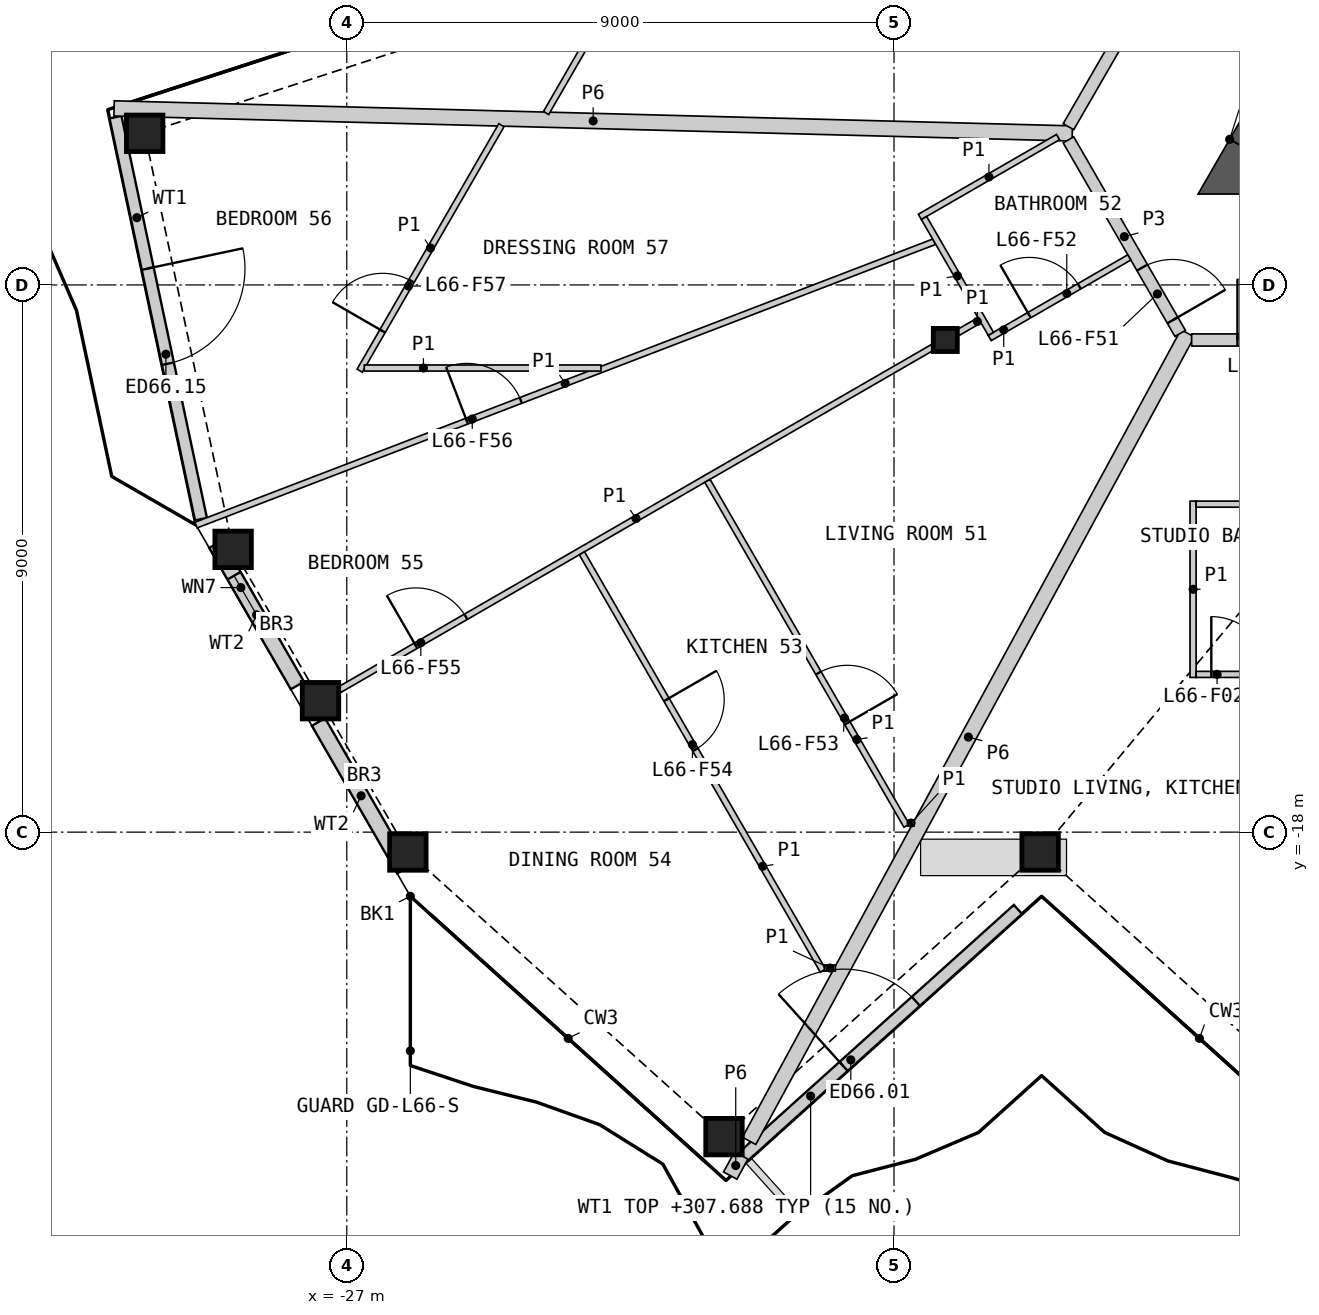
"""IFC4 building model, lengths in metres.
Left out: names, types, materials, properties, quantities, classifications, styles, units other than length and angle.
Written with IfcOpenShell. Run it as: python <this file> out.ifc"""

import sys

from ifc_helpers import new_model, si_unit, direction, frame, frame_2d, origin, origin_2d, place, context, subcontext, project, spatial, polyline, rectangle, hollow_rectangle, i_section, outline, extrude, element, fill, save


model = new_model("IFC4")
c1 = context("Model", 3, precision=1e-05, world=origin(), true_north=direction((0.0, 1.0)))
c2 = subcontext(c1, "Body", "Model", "MODEL_VIEW")
j1 = project(units=[si_unit("LENGTHUNIT", "METRE"), si_unit("PLANEANGLEUNIT", "RADIAN")], contexts=[c1])
p1 = place(None, origin())
s1 = spatial("IfcSite", under=j1, at=p1, CompositionType="ELEMENT")
p2 = place(p1, origin())
s2 = spatial("IfcBuilding", under=s1, at=p2, CompositionType="ELEMENT")
p3 = place(p2, frame((0.0, 0.0, 305.2)))
s3 = spatial("IfcBuildingStorey", under=s2, at=p3, CompositionType="ELEMENT", Elevation=305.2)
for number, where, z_axis, x_axis in (
    (1, (-25.995, -18.327, 0.0), (0.0, 0.0, 1.0), (1.0, 0.0, 0.0)),
    (2, (-20.796, -23.008, 0.0), (0.0, 0.0, 1.0), (1.0, 0.0, 0.0)),
    (3, (-15.597, -18.327, 0.0), (0.0, 0.0, 1.0), (1.0, 0.0, 0.0)),
    (4, (-30.324, -6.506, 0.0), (0.0, 0.0, 1.0), (1.0, 0.0, 0.0)),
    (5, (-28.869, -13.349, 0.0), (0.0, 0.0, 1.0), (1.0, 0.0, 0.0)),
    (6, (-27.432, -15.838, 0.0), (0.0, 0.0, 1.0), (1.0, 0.0, 0.0)),
):
    element("IfcColumn", number, at=place(p3, frame(where, z_axis=z_axis, x_axis=x_axis)), inside=s3, PredefinedType="COLUMN", context=c2, shape_type="SweptSolid", body=[
        extrude(hollow_rectangle(XDim=0.6, YDim=0.6, WallThickness=0.04, at=origin_2d()), origin(), (0.0, 0.0, 1.0), 3.4),
    ])
p4 = place(p3, frame((-17.157, -9.906, 0.0), z_axis=(0.0, 0.0, 1.0), x_axis=(1.0, 0.0, 0.0)))
e7 = element("IfcColumn", 7, at=p4, inside=s3, PredefinedType="COLUMN", context=c2, shape_type="SweptSolid", body=[
    extrude(i_section(OverallWidth=0.396, OverallDepth=0.381, WebThickness=0.019, FlangeThickness=0.03, at=origin_2d()), origin(), (0.0, 0.0, 1.0), 3.4),
])
p5 = place(p3, frame((-20.508, -23.364, 0.0), z_axis=(0.0, 0.0, 1.0), x_axis=(0.743135364919, 0.669141113224, 0.0)))
e8 = element("IfcWall", 8, at=p5, inside=s3, PredefinedType="SOLIDWALL", context=c2, shape_type="SweptSolid", body=[
    extrude(rectangle(XDim=6.117, YDim=0.2, at=frame_2d((3.059, 0.0))), origin(), (0.0, 0.0, 1.0), 2.488),
])
p6 = place(p5, frame((2.259, 0.0, 0.0)))
e9 = element("IfcOpeningElement", 9, at=p6, cuts=e8, PredefinedType="OPENING", context=c2, shape_type="SweptSolid", body=[
    extrude(rectangle(XDim=1.6, YDim=2.25, at=frame_2d((0.8, 1.125))), frame((0.0, 0.11, 0.0), z_axis=(0.0, -1.0, 0.0), x_axis=(1.0, 0.0, 0.0)), (0.0, 0.0, 1.0), 0.22),
])
p7 = place(p3, frame((-30.803, -6.241, 0.0), z_axis=(0.0, 0.0, 1.0), x_axis=(0.207917941651, -0.978146272057, 0.0)))
e10 = element("IfcWall", 10, at=p7, inside=s3, PredefinedType="SOLIDWALL", context=c2, shape_type="SweptSolid", body=[
    extrude(rectangle(XDim=6.759, YDim=0.2, at=frame_2d((3.379, 0.0))), origin(), (0.0, 0.0, 1.0), 2.488),
])
p8 = place(p7, frame((2.545, 0.0, 0.0)))
e11 = element("IfcOpeningElement", 11, at=p8, cuts=e10, PredefinedType="OPENING", context=c2, shape_type="SweptSolid", body=[
    extrude(rectangle(XDim=1.6, YDim=2.25, at=frame_2d((0.8, 1.125))), frame((0.0, 0.11, 0.0), z_axis=(0.0, -1.0, 0.0), x_axis=(1.0, 0.0, 0.0)), (0.0, 0.0, 1.0), 0.22),
])
p9 = place(p3, frame((-29.154, -13.263, 0.0), z_axis=(0.0, 0.0, 1.0), x_axis=(0.500032109083, -0.866006864803, 0.0)))
e12 = element("IfcWall", 12, at=p9, inside=s3, PredefinedType="SOLIDWALL", context=c2, shape_type="SweptSolid", body=[
    extrude(rectangle(XDim=2.684, YDim=0.25, at=frame_2d((1.342, 0.0))), origin(), (0.0, 0.0, 1.0), 2.488),
])
p10 = place(p9, frame((0.6, 0.0, 0.4)))
e13 = element("IfcOpeningElement", 13, at=p10, cuts=e12, PredefinedType="OPENING", context=c2, shape_type="SweptSolid", body=[
    extrude(rectangle(XDim=0.9, YDim=0.6, at=frame_2d((0.45, 0.3))), frame((0.0, 0.135, 0.0), z_axis=(0.0, -1.0, 0.0), x_axis=(1.0, 0.0, 0.0)), (0.0, 0.0, 1.0), 0.27),
])
p11 = place(p3, frame((-27.466, -16.188, 0.0), z_axis=(0.0, 0.0, 1.0), x_axis=(0.499968627931, -0.866043515699, 0.0)))
e14 = element("IfcWall", 14, at=p11, inside=s3, PredefinedType="SOLIDWALL", context=c2, shape_type="SweptSolid", body=[
    extrude(rectangle(XDim=2.804, YDim=0.25, at=frame_2d((1.402, 0.0))), origin(), (0.0, 0.0, 1.0), 2.488),
])
p12 = place(p3, frame((-9.562, -2.15, 0.0), z_axis=(0.0, 0.0, 1.0), x_axis=(-0.500015214976, -0.866016619236, 0.0)))
e15 = element("IfcWall", 15, at=p12, inside=s3, PredefinedType="SHEAR", context=c2, shape_type="SweptSolid", body=[
    extrude(rectangle(XDim=5.318, YDim=0.6, at=frame_2d((2.659, 0.0))), origin(), (0.0, 0.0, 1.0), 3.1),
])
p13 = place(p3, origin())
e16 = element("IfcWall", 16, at=p13, inside=s3, PredefinedType="SHEAR", context=c2, shape_type="SweptSolid", body=[
    extrude(outline(polyline([(-12.48, -6.606), (-11.961, -6.906), (-11.961, -7.506), (-13.0, -7.506), (-12.48, -6.606)])), origin(), (0.0, 0.0, 1.0), 3.1),
])
p14 = place(p3, frame((-30.827, -6.096, 0.0), z_axis=(0.0, 0.0, 1.0), x_axis=(0.999657799118, -0.026158835273, 0.0)))
e17 = element("IfcWall", 17, at=p14, inside=s3, PredefinedType="PARTITIONING", context=c2, shape_type="SweptSolid", body=[
    extrude(rectangle(XDim=15.763, YDim=0.25, at=frame_2d((7.882, 0.0))), origin(), (0.0, 0.0, 1.0), 2.33),
])
p15 = place(p3, frame((-20.383, -23.078, 0.0), z_axis=(0.0, 0.0, 1.0), x_axis=(0.477177412766, 0.878806984921, 0.0)))
e18 = element("IfcWall", 18, at=p15, inside=s3, PredefinedType="PARTITIONING", context=c2, shape_type="SweptSolid", body=[
    extrude(rectangle(XDim=15.114, YDim=0.25, at=frame_2d((7.557, 0.0))), origin(), (0.0, 0.0, 1.0), 2.33),
])
p16 = place(p3, frame((-13.106, -9.906, 0.0), z_axis=(0.0, 0.0, 1.0), x_axis=(1.0, 0.0, 0.0)))
e19 = element("IfcWall", 19, at=p16, inside=s3, PredefinedType="PARTITIONING", context=c2, shape_type="SweptSolid", body=[
    extrude(rectangle(XDim=4.32, YDim=0.2, at=frame_2d((2.16, 0.0))), origin(), (0.0, 0.0, 1.0), 3.1),
])
p17 = place(p16, frame((0.753, 0.0, 0.0)))
e20 = element("IfcOpeningElement", 20, at=p17, cuts=e19, PredefinedType="OPENING", context=c2, shape_type="SweptSolid", body=[
    extrude(rectangle(XDim=1.0, YDim=2.1, at=frame_2d((0.5, 1.05))), frame((0.0, 0.11, 0.0), z_axis=(0.0, -1.0, 0.0), x_axis=(1.0, 0.0, 0.0)), (0.0, 0.0, 1.0), 0.22),
])
p18 = place(p3, frame((-15.131, -6.397, 0.0), z_axis=(0.0, 0.0, 1.0), x_axis=(0.500003406062, 0.866023437285, 0.0)))
e21 = element("IfcWall", 21, at=p18, inside=s3, PredefinedType="PARTITIONING", context=c2, shape_type="SweptSolid", body=[
    extrude(rectangle(XDim=4.288, YDim=0.2, at=frame_2d((2.144, 0.0))), origin(), (0.0, 0.0, 1.0), 3.1),
])
p19 = place(p3, frame((-15.131, -6.614, 0.0), z_axis=(0.0, 0.0, 1.0), x_axis=(0.499967746641, -0.866044024469, 0.0)))
e22 = element("IfcWall", 22, at=p19, inside=s3, PredefinedType="PARTITIONING", context=c2, shape_type="SweptSolid", body=[
    extrude(rectangle(XDim=3.676, YDim=0.2, at=frame_2d((1.838, 0.0))), origin(), (0.0, 0.0, 1.0), 3.1),
])
p20 = place(p19, frame((2.426, 0.0, 0.0)))
e23 = element("IfcOpeningElement", 23, at=p20, cuts=e22, PredefinedType="OPENING", context=c2, shape_type="SweptSolid", body=[
    extrude(rectangle(XDim=1.0, YDim=2.1, at=frame_2d((0.5, 1.05))), frame((0.0, 0.11, 0.0), z_axis=(0.0, -1.0, 0.0), x_axis=(1.0, 0.0, 0.0)), (0.0, 0.0, 1.0), 0.22),
])
p21 = place(p3, frame((-20.693, -23.649, 0.0), z_axis=(0.0, 0.0, 1.0), x_axis=(0.477077538769, 0.878861207474, 0.0)))
e24 = element("IfcWall", 24, at=p21, inside=s3, PredefinedType="PARTITIONING", context=c2, shape_type="SweptSolid", body=[
    extrude(rectangle(XDim=0.376, YDim=0.25, at=frame_2d((0.188, 0.0))), origin(), (0.0, 0.0, 1.0), 2.33),
])
p22 = place(p3, frame((-29.479, -12.95, 0.0), z_axis=(0.0, 0.0, 1.0), x_axis=(0.933581523131, 0.358365092703, 0.0)))
e25 = element("IfcWall", 25, at=p22, inside=s3, PredefinedType="PARTITIONING", context=c2, shape_type="SweptSolid", body=[
    extrude(rectangle(XDim=13.005, YDim=0.1, at=frame_2d((6.502, 0.0))), origin(), (0.0, 0.0, 1.0), 2.33),
])
p23 = place(p22, frame((4.771, 0.0, 0.0)))
e26 = element("IfcOpeningElement", 26, at=p23, cuts=e25, PredefinedType="OPENING", context=c2, shape_type="SweptSolid", body=[
    extrude(rectangle(XDim=0.95, YDim=2.1, at=frame_2d((0.475, 1.05))), frame((0.0, 0.06, 0.0), z_axis=(0.0, -1.0, 0.0), x_axis=(1.0, 0.0, 0.0)), (0.0, 0.0, 1.0), 0.12),
])
p24 = place(p3, frame((-27.122, -15.659, 0.0), z_axis=(0.0, 0.0, 1.0), x_axis=(0.866021046153, 0.500007547564, 0.0)))
e27 = element("IfcWall", 27, at=p24, inside=s3, PredefinedType="PARTITIONING", context=c2, shape_type="SweptSolid", body=[
    extrude(rectangle(XDim=11.267, YDim=0.1, at=frame_2d((5.634, 0.0))), origin(), (0.0, 0.0, 1.0), 2.33),
])
p25 = place(p24, frame((1.452, 0.0, 0.0)))
e28 = element("IfcOpeningElement", 28, at=p25, cuts=e27, PredefinedType="OPENING", context=c2, shape_type="SweptSolid", body=[
    extrude(rectangle(XDim=0.95, YDim=2.1, at=frame_2d((0.475, 1.05))), frame((0.0, 0.06, 0.0), z_axis=(0.0, -1.0, 0.0), x_axis=(1.0, 0.0, 0.0)), (0.0, 0.0, 1.0), 0.12),
])
p26 = place(p3, frame((-23.133, -13.414, 0.0), z_axis=(0.0, 0.0, 1.0), x_axis=(0.500014841469, -0.866016834889, 0.0)))
e29 = element("IfcWall", 29, at=p26, inside=s3, PredefinedType="PARTITIONING", context=c2, shape_type="SweptSolid", body=[
    extrude(rectangle(XDim=7.927, YDim=0.1, at=frame_2d((3.963, 0.0))), origin(), (0.0, 0.0, 1.0), 2.33),
])
p27 = place(p26, frame((2.78, 0.0, 0.0)))
e30 = element("IfcOpeningElement", 30, at=p27, cuts=e29, PredefinedType="OPENING", context=c2, shape_type="SweptSolid", body=[
    extrude(rectangle(XDim=0.95, YDim=2.1, at=frame_2d((0.475, 1.05))), frame((0.0, 0.06, 0.0), z_axis=(0.0, -1.0, 0.0), x_axis=(1.0, 0.0, 0.0)), (0.0, 0.0, 1.0), 0.12),
])
p28 = place(p3, frame((-23.722, -6.172, 0.0), z_axis=(0.0, 0.0, 1.0), x_axis=(0.499991774685, 0.86603015262, 0.0)))
e31 = element("IfcWall", 31, at=p28, inside=s3, PredefinedType="PARTITIONING", context=c2, shape_type="SweptSolid", body=[
    extrude(rectangle(XDim=6.774, YDim=0.1, at=frame_2d((3.387, 0.0))), origin(), (0.0, 0.0, 1.0), 2.33),
])
p29 = place(p28, frame((3.364, 0.0, 0.0)))
e32 = element("IfcOpeningElement", 32, at=p29, cuts=e31, PredefinedType="OPENING", context=c2, shape_type="SweptSolid", body=[
    extrude(rectangle(XDim=0.95, YDim=2.1, at=frame_2d((0.475, 1.05))), frame((0.0, 0.06, 0.0), z_axis=(0.0, -1.0, 0.0), x_axis=(1.0, 0.0, 0.0)), (0.0, 0.0, 1.0), 0.12),
])
p30 = place(p3, frame((-21.069, -12.222, 0.0), z_axis=(0.0, 0.0, 1.0), x_axis=(0.499991310556, -0.866030420579, 0.0)))
e33 = element("IfcWall", 33, at=p30, inside=s3, PredefinedType="PARTITIONING", context=c2, shape_type="SweptSolid", body=[
    extrude(rectangle(XDim=6.55, YDim=0.1, at=frame_2d((3.275, 0.0))), origin(), (0.0, 0.0, 1.0), 2.33),
])
p31 = place(p30, frame((3.65, 0.0, 0.0)))
e34 = element("IfcOpeningElement", 34, at=p31, cuts=e33, PredefinedType="OPENING", context=c2, shape_type="SweptSolid", body=[
    extrude(rectangle(XDim=0.95, YDim=2.1, at=frame_2d((0.475, 1.05))), frame((0.0, 0.06, 0.0), z_axis=(0.0, -1.0, 0.0), x_axis=(1.0, 0.0, 0.0)), (0.0, 0.0, 1.0), 0.12),
])
p32 = place(p3, frame((-26.788, -10.41, 0.0), z_axis=(0.0, 0.0, 1.0), x_axis=(0.499997484116, 0.866026856326, 0.0)))
e35 = element("IfcWall", 35, at=p32, inside=s3, PredefinedType="PARTITIONING", context=c2, shape_type="SweptSolid", body=[
    extrude(rectangle(XDim=4.662, YDim=0.1, at=frame_2d((2.331, 0.0))), origin(), (0.0, 0.0, 1.0), 2.33),
])
p33 = place(p32, frame((0.752, 0.0, 0.0)))
e36 = element("IfcOpeningElement", 36, at=p33, cuts=e35, PredefinedType="OPENING", context=c2, shape_type="SweptSolid", body=[
    extrude(rectangle(XDim=0.95, YDim=2.1, at=frame_2d((0.475, 1.05))), frame((0.0, 0.06, 0.0), z_axis=(0.0, -1.0, 0.0), x_axis=(1.0, 0.0, 0.0)), (0.0, 0.0, 1.0), 0.12),
])
p34 = place(p3, frame((-26.712, -10.367, 0.0), z_axis=(0.0, 0.0, 1.0), x_axis=(1.0, 0.0, 0.0)))
e37 = element("IfcWall", 37, at=p34, inside=s3, PredefinedType="PARTITIONING", context=c2, shape_type="SweptSolid", body=[
    extrude(rectangle(XDim=3.893, YDim=0.1, at=frame_2d((1.946, 0.0))), origin(), (0.0, 0.0, 1.0), 2.33),
])
p35 = place(p3, frame((-13.082, -15.456, 0.0), z_axis=(0.0, 0.0, 1.0), x_axis=(0.0, 1.0, 0.0)))
e38 = element("IfcWall", 38, at=p35, inside=s3, PredefinedType="PARTITIONING", context=c2, shape_type="SweptSolid", body=[
    extrude(rectangle(XDim=2.9, YDim=0.1, at=frame_2d((1.45, 0.0))), origin(), (0.0, 0.0, 1.0), 2.33),
])
p36 = place(p3, frame((-16.426, -9.872, 0.0), z_axis=(0.0, 0.0, 1.0), x_axis=(0.866029095148, 0.499993606316, 0.0)))
e39 = element("IfcWall", 39, at=p36, inside=s3, PredefinedType="PARTITIONING", context=c2, shape_type="SweptSolid", body=[
    extrude(rectangle(XDim=2.65, YDim=0.1, at=frame_2d((1.325, 0.0))), origin(), (0.0, 0.0, 1.0), 2.33),
])
p37 = place(p36, frame((0.75, 0.0, 0.0)))
e40 = element("IfcOpeningElement", 40, at=p37, cuts=e39, PredefinedType="OPENING", context=c2, shape_type="SweptSolid", body=[
    extrude(rectangle(XDim=0.95, YDim=2.1, at=frame_2d((0.475, 1.05))), frame((0.0, 0.06, 0.0), z_axis=(0.0, -1.0, 0.0), x_axis=(1.0, 0.0, 0.0)), (0.0, 0.0, 1.0), 0.12),
])
p38 = place(p3, frame((-13.032, -12.606, 0.0), z_axis=(0.0, 0.0, 1.0), x_axis=(1.0, 0.0, 0.0)))
e41 = element("IfcWall", 41, at=p38, inside=s3, PredefinedType="PARTITIONING", context=c2, shape_type="SweptSolid", body=[
    extrude(rectangle(XDim=2.525, YDim=0.1, at=frame_2d((1.263, 0.0))), origin(), (0.0, 0.0, 1.0), 2.33),
])
p39 = place(p3, frame((-13.032, -15.406, 0.0), z_axis=(0.0, 0.0, 1.0), x_axis=(1.0, 0.0, 0.0)))
e42 = element("IfcWall", 42, at=p39, inside=s3, PredefinedType="PARTITIONING", context=c2, shape_type="SweptSolid", body=[
    extrude(rectangle(XDim=2.525, YDim=0.1, at=frame_2d((1.263, 0.0))), origin(), (0.0, 0.0, 1.0), 2.33),
])
p40 = place(p39, frame((0.25, 0.0, 0.0)))
e43 = element("IfcOpeningElement", 43, at=p40, cuts=e42, PredefinedType="OPENING", context=c2, shape_type="SweptSolid", body=[
    extrude(rectangle(XDim=0.95, YDim=2.1, at=frame_2d((0.475, 1.05))), frame((0.0, 0.06, 0.0), z_axis=(0.0, -1.0, 0.0), x_axis=(1.0, 0.0, 0.0)), (0.0, 0.0, 1.0), 0.12),
])
p41 = place(p3, frame((-17.575, -7.881, 0.0), z_axis=(0.0, 0.0, 1.0), x_axis=(0.866013657776, 0.500020344131, 0.0)))
e44 = element("IfcWall", 44, at=p41, inside=s3, PredefinedType="PARTITIONING", context=c2, shape_type="SweptSolid", body=[
    extrude(rectangle(XDim=2.625, YDim=0.1, at=frame_2d((1.312, 0.0))), origin(), (0.0, 0.0, 1.0), 2.33),
])
p42 = place(p3, frame((-17.507, -7.899, 0.0), z_axis=(0.0, 0.0, 1.0), x_axis=(0.499946605688, -0.86605622881, 0.0)))
e45 = element("IfcWall", 45, at=p42, inside=s3, PredefinedType="PARTITIONING", context=c2, shape_type="SweptSolid", body=[
    extrude(rectangle(XDim=2.2, YDim=0.1, at=frame_2d((1.1, 0.0))), origin(), (0.0, 0.0, 1.0), 2.33),
])
p43 = place(p3, frame((-16.949, -9.786, 0.0), z_axis=(0.0, 0.0, 1.0), x_axis=(0.866036909293, 0.499980071345, 0.0)))
e46 = element("IfcWall", 46, at=p43, inside=s3, PredefinedType="PARTITIONING", context=c2, shape_type="SweptSolid", body=[
    extrude(rectangle(XDim=0.41, YDim=0.1, at=frame_2d((0.205, 0.0))), origin(), (0.0, 0.0, 1.0), 2.33),
])
p44 = place(p3, frame((-19.145, -20.235, 0.0), z_axis=(0.0, 0.0, 1.0), x_axis=(1.0, 0.0, 0.0)))
e47 = element("IfcWall", 47, at=p44, inside=s3, PredefinedType="PARTITIONING", context=c2, shape_type="SweptSolid", body=[
    extrude(rectangle(XDim=0.18, YDim=0.1, at=frame_2d((0.09, 0.0))), origin(), (0.0, 0.0, 1.0), 2.33),
])
p45 = place(p3, frame((-17.769, -17.852, 0.0), z_axis=(0.0, 0.0, 1.0), x_axis=(1.0, 0.0, 0.0)))
e48 = element("IfcWall", 48, at=p45, inside=s3, PredefinedType="PARTITIONING", context=c2, shape_type="SweptSolid", body=[
    extrude(rectangle(XDim=0.098, YDim=0.1, at=frame_2d((0.049, 0.0))), origin(), (0.0, 0.0, 1.0), 2.33),
])
p46 = place(p6, origin())
e49 = element("IfcDoor", 49, at=p46, inside=s3, OperationType="DOUBLE_DOOR_SINGLE_SWING", PredefinedType="DOOR", context=c2, shape_type="SweptSolid", body=[
    extrude(rectangle(XDim=1.6, YDim=2.25, at=frame_2d((0.8, 1.125))), frame((0.0, 0.025, 0.0), z_axis=(0.0, -1.0, 0.0), x_axis=(1.0, 0.0, 0.0)), (0.0, 0.0, 1.0), 0.05),
])
fill(e9, e49)
p47 = place(p8, origin())
e50 = element("IfcDoor", 50, at=p47, inside=s3, OperationType="DOUBLE_DOOR_SINGLE_SWING", PredefinedType="DOOR", context=c2, shape_type="SweptSolid", body=[
    extrude(rectangle(XDim=1.6, YDim=2.25, at=frame_2d((0.8, 1.125))), frame((0.0, 0.025, 0.0), z_axis=(0.0, -1.0, 0.0), x_axis=(1.0, 0.0, 0.0)), (0.0, 0.0, 1.0), 0.05),
])
fill(e11, e50)
p48 = place(p10, origin())
e51 = element("IfcWindow", 51, at=p48, inside=s3, PartitioningType="SINGLE_PANEL", PredefinedType="WINDOW", context=c2, shape_type="SweptSolid", body=[
    extrude(rectangle(XDim=0.9, YDim=0.6, at=frame_2d((0.45, 0.3))), frame((0.0, 0.03, 0.0), z_axis=(0.0, -1.0, 0.0), x_axis=(1.0, 0.0, 0.0)), (0.0, 0.0, 1.0), 0.06),
])
fill(e13, e51)
p49 = place(p17, origin())
e52 = element("IfcDoor", 52, at=p49, inside=s3, OperationType="SINGLE_SWING_LEFT", PredefinedType="DOOR", context=c2, shape_type="SweptSolid", body=[
    extrude(rectangle(XDim=1.0, YDim=2.1, at=frame_2d((0.5, 1.05))), frame((0.0, 0.025, 0.0), z_axis=(0.0, -1.0, 0.0), x_axis=(1.0, 0.0, 0.0)), (0.0, 0.0, 1.0), 0.05),
])
fill(e20, e52)
p50 = place(p40, origin())
e53 = element("IfcDoor", 53, at=p50, inside=s3, OperationType="SINGLE_SWING_LEFT", PredefinedType="DOOR", context=c2, shape_type="SweptSolid", body=[
    extrude(rectangle(XDim=0.95, YDim=2.1, at=frame_2d((0.475, 1.05))), frame((0.0, 0.025, 0.0), z_axis=(0.0, -1.0, 0.0), x_axis=(1.0, 0.0, 0.0)), (0.0, 0.0, 1.0), 0.05),
])
fill(e43, e53)
p51 = place(p20, origin())
e54 = element("IfcDoor", 54, at=p51, inside=s3, OperationType="SINGLE_SWING_RIGHT", PredefinedType="DOOR", context=c2, shape_type="SweptSolid", body=[
    extrude(rectangle(XDim=1.0, YDim=2.1, at=frame_2d((0.5, 1.05))), frame((0.0, 0.025, 0.0), z_axis=(0.0, -1.0, 0.0), x_axis=(1.0, 0.0, 0.0)), (0.0, 0.0, 1.0), 0.05),
])
fill(e23, e54)
p52 = place(p37, origin())
e55 = element("IfcDoor", 55, at=p52, inside=s3, OperationType="SINGLE_SWING_LEFT", PredefinedType="DOOR", context=c2, shape_type="SweptSolid", body=[
    extrude(rectangle(XDim=0.95, YDim=2.1, at=frame_2d((0.475, 1.05))), frame((0.0, 0.025, 0.0), z_axis=(0.0, -1.0, 0.0), x_axis=(1.0, 0.0, 0.0)), (0.0, 0.0, 1.0), 0.05),
])
fill(e40, e55)
p53 = place(p31, origin())
e56 = element("IfcDoor", 56, at=p53, inside=s3, OperationType="SINGLE_SWING_RIGHT", PredefinedType="DOOR", context=c2, shape_type="SweptSolid", body=[
    extrude(rectangle(XDim=0.95, YDim=2.1, at=frame_2d((0.475, 1.05))), frame((0.0, 0.025, 0.0), z_axis=(0.0, -1.0, 0.0), x_axis=(1.0, 0.0, 0.0)), (0.0, 0.0, 1.0), 0.05),
])
fill(e34, e56)
p54 = place(p27, origin())
e57 = element("IfcDoor", 57, at=p54, inside=s3, OperationType="SINGLE_SWING_LEFT", PredefinedType="DOOR", context=c2, shape_type="SweptSolid", body=[
    extrude(rectangle(XDim=0.95, YDim=2.1, at=frame_2d((0.475, 1.05))), frame((0.0, 0.025, 0.0), z_axis=(0.0, -1.0, 0.0), x_axis=(1.0, 0.0, 0.0)), (0.0, 0.0, 1.0), 0.05),
])
fill(e30, e57)
p55 = place(p25, origin())
e58 = element("IfcDoor", 58, at=p55, inside=s3, OperationType="SINGLE_SWING_LEFT", PredefinedType="DOOR", context=c2, shape_type="SweptSolid", body=[
    extrude(rectangle(XDim=0.95, YDim=2.1, at=frame_2d((0.475, 1.05))), frame((0.0, 0.025, 0.0), z_axis=(0.0, -1.0, 0.0), x_axis=(1.0, 0.0, 0.0)), (0.0, 0.0, 1.0), 0.05),
])
fill(e28, e58)
p56 = place(p23, origin())
e59 = element("IfcDoor", 59, at=p56, inside=s3, OperationType="SINGLE_SWING_LEFT", PredefinedType="DOOR", context=c2, shape_type="SweptSolid", body=[
    extrude(rectangle(XDim=0.95, YDim=2.1, at=frame_2d((0.475, 1.05))), frame((0.0, 0.025, 0.0), z_axis=(0.0, -1.0, 0.0), x_axis=(1.0, 0.0, 0.0)), (0.0, 0.0, 1.0), 0.05),
])
fill(e26, e59)
p57 = place(p33, origin())
e60 = element("IfcDoor", 60, at=p57, inside=s3, OperationType="SINGLE_SWING_LEFT", PredefinedType="DOOR", context=c2, shape_type="SweptSolid", body=[
    extrude(rectangle(XDim=0.95, YDim=2.1, at=frame_2d((0.475, 1.05))), frame((0.0, 0.025, 0.0), z_axis=(0.0, -1.0, 0.0), x_axis=(1.0, 0.0, 0.0)), (0.0, 0.0, 1.0), 0.05),
])
fill(e36, e60)
save(model, sys.argv[1])
